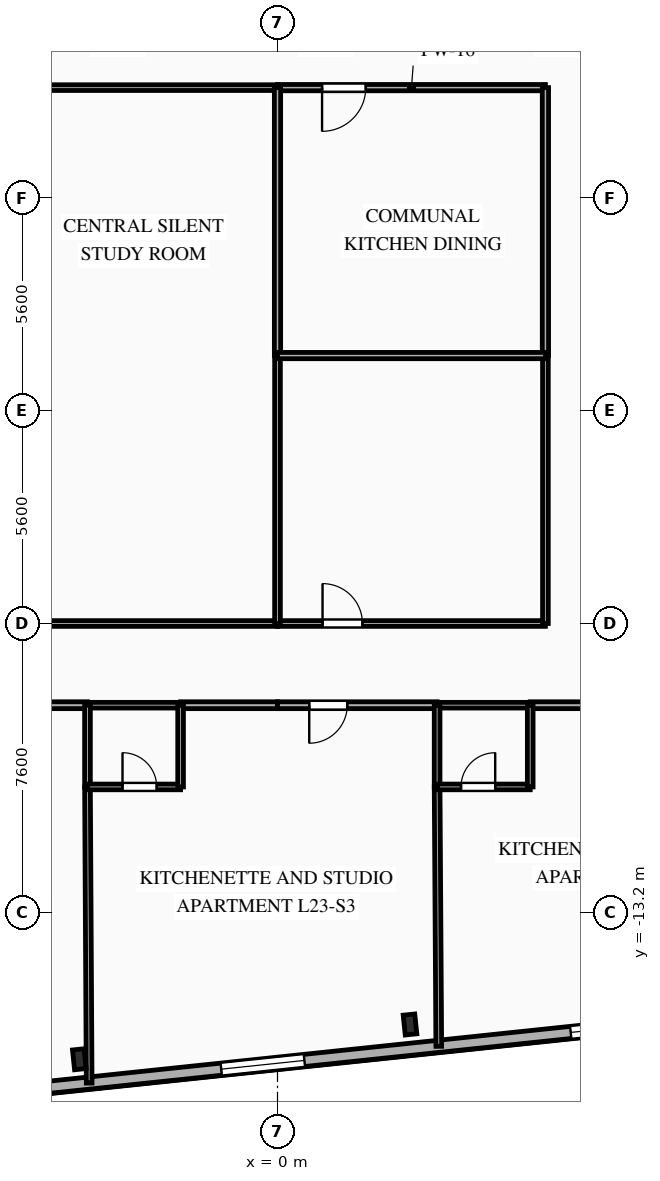
"""IFC4 building model, lengths in metres.
Left out: names, types, materials, properties, quantities, classifications, styles, units other than length and angle.
Written with IfcOpenShell. Run it as: python <this file> out.ifc"""

import sys

from ifc_helpers import new_model, si_unit, direction, frame, frame_2d, origin, origin_2d, place, context, subcontext, project, spatial, rectangle, i_section, extrude, element, fill, save


model = new_model("IFC4")
c1 = context("Model", 3, precision=1e-05, world=origin(), true_north=direction((0.0, 1.0)))
c2 = subcontext(c1, "Body", "Model", "MODEL_VIEW")
j1 = project(units=[si_unit("LENGTHUNIT", "METRE"), si_unit("PLANEANGLEUNIT", "RADIAN")], contexts=[c1])
p1 = place(None, origin())
s1 = spatial("IfcSite", under=j1, at=p1, CompositionType="ELEMENT")
p2 = place(p1, origin())
s2 = spatial("IfcBuilding", under=s1, at=p2, CompositionType="ELEMENT")
p3 = place(p2, frame((0.0, 0.0, 85.7)))
s3 = spatial("IfcBuildingStorey", under=s2, at=p3, CompositionType="ELEMENT", Elevation=85.7)
for number, where, z_axis, x_axis in (
    (1, (-5.215, -17.066, 0.0), (0.0, 0.0, 1.0), (0.995, 0.105, 0.0)),
    (2, (3.487, -16.151, 0.0), (0.0, 0.0, 1.0), (0.995, 0.105, 0.0)),
):
    element("IfcColumn", number, at=place(p3, frame(where, z_axis=z_axis, x_axis=x_axis)), inside=s3, PredefinedType="COLUMN", context=c2, shape_type="SweptSolid", body=[
        extrude(i_section(OverallWidth=0.306, OverallDepth=0.524, WebThickness=0.021, FlangeThickness=0.04, FilletRadius=0.027, at=origin_2d()), origin(), (0.0, 0.0, 1.0), 3.35),
    ])
p4 = place(p3, frame((30.307, -13.986, 0.0), z_axis=(0.0, 0.0, 1.0), x_axis=(-0.994521628355, -0.104531003701, 0.0)))
e3 = element("IfcWall", 3, at=p4, inside=s3, PredefinedType="SOLIDWALL", context=c2, shape_type="SweptSolid", body=[
    extrude(rectangle(XDim=53.8, YDim=0.32, at=frame_2d((26.9, 0.0))), origin(), (0.0, 0.0, 1.0), 3.045),
])
p5 = place(p4, frame((11.344, 0.0, 0.85)))
e4 = element("IfcOpeningElement", 4, at=p5, cuts=e3, PredefinedType="OPENING", context=c2, shape_type="SweptSolid", body=[
    extrude(rectangle(XDim=1.65, YDim=1.85, at=frame_2d((0.825, 0.925))), frame((0.0, 0.17, 0.0), z_axis=(0.0, -1.0, 0.0), x_axis=(1.0, 0.0, 0.0)), (0.0, 0.0, 1.0), 0.34),
])
p6 = place(p4, frame((20.516, 0.0, 0.85)))
e5 = element("IfcOpeningElement", 5, at=p6, cuts=e3, PredefinedType="OPENING", context=c2, shape_type="SweptSolid", body=[
    extrude(rectangle(XDim=2.2, YDim=1.85, at=frame_2d((1.1, 0.925))), frame((0.0, 0.17, 0.0), z_axis=(0.0, -1.0, 0.0), x_axis=(1.0, 0.0, 0.0)), (0.0, 0.0, 1.0), 0.34),
])
p7 = place(p4, frame((29.763, 0.0, 0.85)))
e6 = element("IfcOpeningElement", 6, at=p7, cuts=e3, PredefinedType="OPENING", context=c2, shape_type="SweptSolid", body=[
    extrude(rectangle(XDim=2.2, YDim=1.85, at=frame_2d((1.1, 0.925))), frame((0.0, 0.17, 0.0), z_axis=(0.0, -1.0, 0.0), x_axis=(1.0, 0.0, 0.0)), (0.0, 0.0, 1.0), 0.34),
])
p8 = place(p4, frame((39.01, 0.0, 0.85)))
e7 = element("IfcOpeningElement", 7, at=p8, cuts=e3, PredefinedType="OPENING", context=c2, shape_type="SweptSolid", body=[
    extrude(rectangle(XDim=2.2, YDim=1.85, at=frame_2d((1.1, 0.925))), frame((0.0, 0.17, 0.0), z_axis=(0.0, -1.0, 0.0), x_axis=(1.0, 0.0, 0.0)), (0.0, 0.0, 1.0), 0.34),
])
p9 = place(p4, frame((46.13, 0.0, 0.85)))
e8 = element("IfcOpeningElement", 8, at=p9, cuts=e3, PredefinedType="OPENING", context=c2, shape_type="SweptSolid", body=[
    extrude(rectangle(XDim=1.65, YDim=1.85, at=frame_2d((0.825, 0.925))), frame((0.0, 0.17, 0.0), z_axis=(0.0, -1.0, 0.0), x_axis=(1.0, 0.0, 0.0)), (0.0, 0.0, 1.0), 0.34),
])
p10 = place(p4, frame((50.453, 0.0, 0.85)))
e9 = element("IfcOpeningElement", 9, at=p10, cuts=e3, PredefinedType="OPENING", context=c2, shape_type="SweptSolid", body=[
    extrude(rectangle(XDim=1.65, YDim=1.85, at=frame_2d((0.825, 0.925))), frame((0.0, 0.17, 0.0), z_axis=(0.0, -1.0, 0.0), x_axis=(1.0, 0.0, 0.0)), (0.0, 0.0, 1.0), 0.34),
])
p11 = place(p3, frame((0.0, 8.5, 0.0), z_axis=(0.0, 0.0, 1.0), x_axis=(-1.0, 0.0, 0.0)))
e10 = element("IfcWall", 10, at=p11, inside=s3, PredefinedType="PARTITIONING", context=c2, shape_type="SweptSolid", body=[
    extrude(rectangle(XDim=7.05, YDim=0.15, at=frame_2d((3.525, 0.0))), origin(), (0.0, 0.0, 1.0), 3.045),
])
p12 = place(p3, frame((7.05, 8.5, 0.0), z_axis=(0.0, 0.0, 1.0), x_axis=(-1.0, 0.0, 0.0)))
e11 = element("IfcWall", 11, at=p12, inside=s3, PredefinedType="PARTITIONING", context=c2, shape_type="SweptSolid", body=[
    extrude(rectangle(XDim=7.05, YDim=0.165, at=frame_2d((3.525, 0.0))), origin(), (0.0, 0.0, 1.0), 3.045),
])
p13 = place(p12, frame((4.728, 0.0, 0.0)))
e12 = element("IfcOpeningElement", 12, at=p13, cuts=e11, PredefinedType="OPENING", context=c2, shape_type="SweptSolid", body=[
    extrude(rectangle(XDim=1.15, YDim=2.15, at=frame_2d((0.575, 1.075))), frame((0.0, 0.093, 0.0), z_axis=(0.0, -1.0, 0.0), x_axis=(1.0, 0.0, 0.0)), (0.0, 0.0, 1.0), 0.185),
])
p14 = place(p3, frame((-5.0, -7.75, 0.0), z_axis=(0.0, 0.0, 1.0), x_axis=(-1.0, 0.0, 0.0)))
e13 = element("IfcWall", 13, at=p14, inside=s3, PredefinedType="PARTITIONING", context=c2, shape_type="SweptSolid", body=[
    extrude(rectangle(XDim=6.75, YDim=0.18, at=frame_2d((3.375, 0.0))), origin(), (0.0, 0.0, 1.0), 3.045),
])
p15 = place(p14, frame((1.154, 0.0, 0.0)))
e14 = element("IfcOpeningElement", 14, at=p15, cuts=e13, PredefinedType="OPENING", context=c2, shape_type="SweptSolid", body=[
    extrude(rectangle(XDim=1.0, YDim=2.15, at=frame_2d((0.5, 1.075))), frame((0.0, 0.1, 0.0), z_axis=(0.0, -1.0, 0.0), x_axis=(1.0, 0.0, 0.0)), (0.0, 0.0, 1.0), 0.2),
])
p16 = place(p3, frame((0.0, -7.75, 0.0), z_axis=(0.0, 0.0, 1.0), x_axis=(-1.0, 0.0, 0.0)))
e15 = element("IfcWall", 15, at=p16, inside=s3, PredefinedType="PARTITIONING", context=c2, shape_type="SweptSolid", body=[
    extrude(rectangle(XDim=2.55, YDim=0.18, at=frame_2d((1.275, 0.0))), origin(), (0.0, 0.0, 1.0), 3.045),
])
p17 = place(p3, frame((-2.55, -7.75, 0.0), z_axis=(0.0, 0.0, 1.0), x_axis=(-1.0, 0.0, 0.0)))
e16 = element("IfcWall", 16, at=p17, inside=s3, PredefinedType="PLUMBINGWALL", context=c2, shape_type="SweptSolid", body=[
    extrude(rectangle(XDim=2.45, YDim=0.15, at=frame_2d((1.225, 0.0))), origin(), (0.0, 0.0, 1.0), 3.045),
])
p18 = place(p3, frame((-7.05, -5.6, 0.0), z_axis=(0.0, 0.0, 1.0), x_axis=(1.0, 0.0, 0.0)))
e17 = element("IfcWall", 17, at=p18, inside=s3, PredefinedType="PARTITIONING", context=c2, shape_type="SweptSolid", body=[
    extrude(rectangle(XDim=7.05, YDim=0.15, at=frame_2d((3.525, 0.0))), origin(), (0.0, 0.0, 1.0), 2.53),
])
p19 = place(p3, frame((4.2, -7.75, 0.0), z_axis=(0.0, 0.0, 1.0), x_axis=(-1.0, 0.0, 0.0)))
e18 = element("IfcWall", 18, at=p19, inside=s3, PredefinedType="PARTITIONING", context=c2, shape_type="SweptSolid", body=[
    extrude(rectangle(XDim=4.2, YDim=0.18, at=frame_2d((2.1, 0.0))), origin(), (0.0, 0.0, 1.0), 3.045),
])
p20 = place(p19, frame((2.365, 0.0, 0.0)))
e19 = element("IfcOpeningElement", 19, at=p20, cuts=e18, PredefinedType="OPENING", context=c2, shape_type="SweptSolid", body=[
    extrude(rectangle(XDim=1.0, YDim=2.15, at=frame_2d((0.5, 1.075))), frame((0.0, 0.1, 0.0), z_axis=(0.0, -1.0, 0.0), x_axis=(1.0, 0.0, 0.0)), (0.0, 0.0, 1.0), 0.2),
])
p21 = place(p3, frame((13.4, -7.75, 0.0), z_axis=(0.0, 0.0, 1.0), x_axis=(-1.0, 0.0, 0.0)))
e20 = element("IfcWall", 20, at=p21, inside=s3, PredefinedType="PARTITIONING", context=c2, shape_type="SweptSolid", body=[
    extrude(rectangle(XDim=6.75, YDim=0.18, at=frame_2d((3.375, 0.0))), origin(), (0.0, 0.0, 1.0), 3.045),
])
p22 = place(p21, frame((1.154, 0.0, 0.0)))
e21 = element("IfcOpeningElement", 21, at=p22, cuts=e20, PredefinedType="OPENING", context=c2, shape_type="SweptSolid", body=[
    extrude(rectangle(XDim=1.0, YDim=2.15, at=frame_2d((0.5, 1.075))), frame((0.0, 0.1, 0.0), z_axis=(0.0, -1.0, 0.0), x_axis=(1.0, 0.0, 0.0)), (0.0, 0.0, 1.0), 0.2),
])
p23 = place(p3, frame((6.65, -7.75, 0.0), z_axis=(0.0, 0.0, 1.0), x_axis=(-1.0, 0.0, 0.0)))
e22 = element("IfcWall", 22, at=p23, inside=s3, PredefinedType="PLUMBINGWALL", context=c2, shape_type="SweptSolid", body=[
    extrude(rectangle(XDim=2.45, YDim=0.15, at=frame_2d((1.225, 0.0))), origin(), (0.0, 0.0, 1.0), 3.045),
])
p24 = place(p3, frame((0.0, -5.6, 0.0), z_axis=(0.0, 0.0, 1.0), x_axis=(1.0, 0.0, 0.0)))
e23 = element("IfcWall", 23, at=p24, inside=s3, PredefinedType="PARTITIONING", context=c2, shape_type="SweptSolid", body=[
    extrude(rectangle(XDim=7.05, YDim=0.15, at=frame_2d((3.525, 0.0))), origin(), (0.0, 0.0, 1.0), 2.53),
])
p25 = place(p24, frame((1.185, 0.0, 0.0)))
e24 = element("IfcOpeningElement", 24, at=p25, cuts=e23, PredefinedType="OPENING", context=c2, shape_type="SweptSolid", body=[
    extrude(rectangle(XDim=1.05, YDim=2.15, at=frame_2d((0.525, 1.075))), frame((0.0, 0.085, 0.0), z_axis=(0.0, -1.0, 0.0), x_axis=(1.0, 0.0, 0.0)), (0.0, 0.0, 1.0), 0.17),
])
p26 = place(p3, frame((7.05, -5.6, 0.0), z_axis=(0.0, 0.0, 1.0), x_axis=(0.0, 1.0, 0.0)))
e25 = element("IfcWall", 25, at=p26, inside=s3, PredefinedType="PARTITIONING", context=c2, shape_type="SweptSolid", body=[
    extrude(rectangle(XDim=7.05, YDim=0.15, at=frame_2d((3.525, 0.0))), origin(), (0.0, 0.0, 1.0), 3.045),
])
p27 = place(p3, frame((7.05, 1.45, 0.0), z_axis=(0.0, 0.0, 1.0), x_axis=(0.0, 1.0, 0.0)))
e26 = element("IfcWall", 26, at=p27, inside=s3, PredefinedType="PARTITIONING", context=c2, shape_type="SweptSolid", body=[
    extrude(rectangle(XDim=7.05, YDim=0.165, at=frame_2d((3.525, 0.0))), origin(), (0.0, 0.0, 1.0), 3.045),
])
p28 = place(p3, frame((-5.0, -9.9, 0.0), z_axis=(0.0, 0.0, 1.0), x_axis=(0.005639538101, -0.999984097679, 0.0)))
e27 = element("IfcWall", 27, at=p28, inside=s3, PredefinedType="PARTITIONING", context=c2, shape_type="SweptSolid", body=[
    extrude(rectangle(XDim=7.792, YDim=0.15, at=frame_2d((3.896, 0.0))), origin(), (0.0, 0.0, 1.0), 3.045),
])
p29 = place(p3, frame((-5.0, -7.75, 0.0), z_axis=(0.0, 0.0, 1.0), x_axis=(0.0, -1.0, 0.0)))
e28 = element("IfcWall", 28, at=p29, inside=s3, PredefinedType="PLUMBINGWALL", context=c2, shape_type="SweptSolid", body=[
    extrude(rectangle(XDim=2.15, YDim=0.15, at=frame_2d((1.075, 0.0))), origin(), (0.0, 0.0, 1.0), 3.045),
])
p30 = place(p3, frame((-5.0, -9.9, 0.0), z_axis=(0.0, 0.0, 1.0), x_axis=(1.0, 0.0, 0.0)))
e29 = element("IfcWall", 29, at=p30, inside=s3, PredefinedType="PLUMBINGWALL", context=c2, shape_type="SweptSolid", body=[
    extrude(rectangle(XDim=2.45, YDim=0.15, at=frame_2d((1.225, 0.0))), origin(), (0.0, 0.0, 1.0), 3.045),
])
p31 = place(p30, frame((0.921, 0.0, 0.0)))
e30 = element("IfcOpeningElement", 30, at=p31, cuts=e29, PredefinedType="OPENING", context=c2, shape_type="SweptSolid", body=[
    extrude(rectangle(XDim=0.9, YDim=2.1, at=frame_2d((0.45, 1.05))), frame((0.0, 0.085, 0.0), z_axis=(0.0, -1.0, 0.0), x_axis=(1.0, 0.0, 0.0)), (0.0, 0.0, 1.0), 0.17),
])
p32 = place(p3, frame((-2.55, -9.9, 0.0), z_axis=(0.0, 0.0, 1.0), x_axis=(0.0, 1.0, 0.0)))
e31 = element("IfcWall", 31, at=p32, inside=s3, PredefinedType="PLUMBINGWALL", context=c2, shape_type="SweptSolid", body=[
    extrude(rectangle(XDim=2.15, YDim=0.15, at=frame_2d((1.075, 0.0))), origin(), (0.0, 0.0, 1.0), 3.045),
])
p33 = place(p3, frame((4.2, -9.9, 0.0), z_axis=(0.0, 0.0, 1.0), x_axis=(0.00643855591, -0.999979272284, 0.0)))
e32 = element("IfcWall", 32, at=p33, inside=s3, PredefinedType="PARTITIONING", context=c2, shape_type="SweptSolid", body=[
    extrude(rectangle(XDim=6.825, YDim=0.15, at=frame_2d((3.413, 0.0))), origin(), (0.0, 0.0, 1.0), 3.045),
])
p34 = place(p3, frame((4.2, -7.75, 0.0), z_axis=(0.0, 0.0, 1.0), x_axis=(0.0, -1.0, 0.0)))
e33 = element("IfcWall", 33, at=p34, inside=s3, PredefinedType="PLUMBINGWALL", context=c2, shape_type="SweptSolid", body=[
    extrude(rectangle(XDim=2.15, YDim=0.15, at=frame_2d((1.075, 0.0))), origin(), (0.0, 0.0, 1.0), 3.045),
])
p35 = place(p3, frame((4.2, -9.9, 0.0), z_axis=(0.0, 0.0, 1.0), x_axis=(1.0, 0.0, 0.0)))
e34 = element("IfcWall", 34, at=p35, inside=s3, PredefinedType="PLUMBINGWALL", context=c2, shape_type="SweptSolid", body=[
    extrude(rectangle(XDim=2.45, YDim=0.15, at=frame_2d((1.225, 0.0))), origin(), (0.0, 0.0, 1.0), 3.045),
])
p36 = place(p35, frame((0.629, 0.0, 0.0)))
e35 = element("IfcOpeningElement", 35, at=p36, cuts=e34, PredefinedType="OPENING", context=c2, shape_type="SweptSolid", body=[
    extrude(rectangle(XDim=0.9, YDim=2.1, at=frame_2d((0.45, 1.05))), frame((0.0, 0.085, 0.0), z_axis=(0.0, -1.0, 0.0), x_axis=(1.0, 0.0, 0.0)), (0.0, 0.0, 1.0), 0.17),
])
p37 = place(p3, frame((6.65, -9.9, 0.0), z_axis=(0.0, 0.0, 1.0), x_axis=(0.0, 1.0, 0.0)))
e36 = element("IfcWall", 36, at=p37, inside=s3, PredefinedType="PLUMBINGWALL", context=c2, shape_type="SweptSolid", body=[
    extrude(rectangle(XDim=2.15, YDim=0.15, at=frame_2d((1.075, 0.0))), origin(), (0.0, 0.0, 1.0), 3.045),
])
p38 = place(p3, frame((0.0, 1.45, 0.0), z_axis=(0.0, 0.0, 1.0), x_axis=(0.0, -1.0, 0.0)))
e37 = element("IfcWall", 37, at=p38, inside=s3, PredefinedType="PARTITIONING", context=c2, shape_type="SweptSolid", body=[
    extrude(rectangle(XDim=7.05, YDim=0.15, at=frame_2d((3.525, 0.0))), origin(), (0.0, 0.0, 1.0), 3.045),
])
for number, where, z_axis, x_axis in (
    (38, (0.0, 8.5, 0.0), (0.0, 0.0, 1.0), (0.0, -1.0, 0.0)),
    (39, (0.0, 1.45, 0.0), (0.0, 0.0, 1.0), (1.0, 0.0, 0.0)),
):
    element("IfcWall", number, at=place(p3, frame(where, z_axis=z_axis, x_axis=x_axis)), inside=s3, PredefinedType="PARTITIONING", context=c2, shape_type="SweptSolid", body=[
        extrude(rectangle(XDim=7.05, YDim=0.165, at=frame_2d((3.525, 0.0))), origin(), (0.0, 0.0, 1.0), 3.045),
    ])
p39 = place(p6, origin())
e40 = element("IfcWindow", 40, at=p39, inside=s3, PartitioningType="SINGLE_PANEL", PredefinedType="WINDOW", context=c2, shape_type="SweptSolid", body=[
    extrude(rectangle(XDim=2.2, YDim=1.85, at=frame_2d((1.1, 0.925))), frame((0.0, 0.03, 0.0), z_axis=(0.0, -1.0, 0.0), x_axis=(1.0, 0.0, 0.0)), (0.0, 0.0, 1.0), 0.06),
])
fill(e5, e40)
p40 = place(p7, origin())
e41 = element("IfcWindow", 41, at=p40, inside=s3, PartitioningType="SINGLE_PANEL", PredefinedType="WINDOW", context=c2, shape_type="SweptSolid", body=[
    extrude(rectangle(XDim=2.2, YDim=1.85, at=frame_2d((1.1, 0.925))), frame((0.0, 0.03, 0.0), z_axis=(0.0, -1.0, 0.0), x_axis=(1.0, 0.0, 0.0)), (0.0, 0.0, 1.0), 0.06),
])
fill(e6, e41)
p41 = place(p13, origin())
e42 = element("IfcDoor", 42, at=p41, inside=s3, OperationType="SINGLE_SWING_RIGHT", PredefinedType="DOOR", context=c2, shape_type="SweptSolid", body=[
    extrude(rectangle(XDim=1.15, YDim=2.15, at=frame_2d((0.575, 1.075))), frame((0.0, 0.025, 0.0), z_axis=(0.0, -1.0, 0.0), x_axis=(1.0, 0.0, 0.0)), (0.0, 0.0, 1.0), 0.05),
])
fill(e12, e42)
p42 = place(p20, origin())
e43 = element("IfcDoor", 43, at=p42, inside=s3, OperationType="SINGLE_SWING_RIGHT", PredefinedType="DOOR", context=c2, shape_type="SweptSolid", body=[
    extrude(rectangle(XDim=1.0, YDim=2.15, at=frame_2d((0.5, 1.075))), frame((0.0, 0.025, 0.0), z_axis=(0.0, -1.0, 0.0), x_axis=(1.0, 0.0, 0.0)), (0.0, 0.0, 1.0), 0.05),
])
fill(e19, e43)
p43 = place(p25, origin())
e44 = element("IfcDoor", 44, at=p43, inside=s3, OperationType="SINGLE_SWING_LEFT", PredefinedType="DOOR", context=c2, shape_type="SweptSolid", body=[
    extrude(rectangle(XDim=1.05, YDim=2.15, at=frame_2d((0.525, 1.075))), frame((0.0, 0.025, 0.0), z_axis=(0.0, -1.0, 0.0), x_axis=(1.0, 0.0, 0.0)), (0.0, 0.0, 1.0), 0.05),
])
fill(e24, e44)
p44 = place(p31, origin())
e45 = element("IfcDoor", 45, at=p44, inside=s3, OperationType="SINGLE_SWING_LEFT", PredefinedType="DOOR", context=c2, shape_type="SweptSolid", body=[
    extrude(rectangle(XDim=0.9, YDim=2.1, at=frame_2d((0.45, 1.05))), frame((0.0, 0.025, 0.0), z_axis=(0.0, -1.0, 0.0), x_axis=(1.0, 0.0, 0.0)), (0.0, 0.0, 1.0), 0.05),
])
fill(e30, e45)
p45 = place(p36, origin())
e46 = element("IfcDoor", 46, at=p45, inside=s3, OperationType="SINGLE_SWING_RIGHT", PredefinedType="DOOR", context=c2, shape_type="SweptSolid", body=[
    extrude(rectangle(XDim=0.9, YDim=2.1, at=frame_2d((0.45, 1.05))), frame((0.0, 0.025, 0.0), z_axis=(0.0, -1.0, 0.0), x_axis=(1.0, 0.0, 0.0)), (0.0, 0.0, 1.0), 0.05),
])
fill(e35, e46)
save(model, sys.argv[1])
